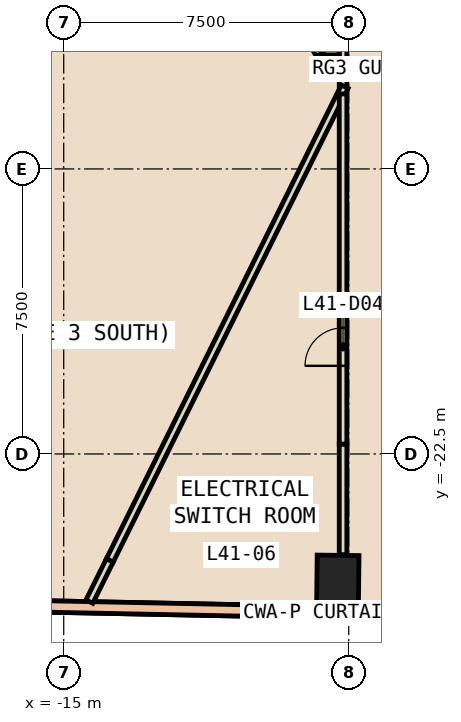
"""IFC4 building model, lengths in metres.
Left out: names, types, materials, properties, quantities, classifications, styles, units other than length and angle.
Written with IfcOpenShell. Run it as: python <this file> out.ifc"""

import sys

from ifc_helpers import new_model, si_unit, direction, frame, frame_2d, origin, origin_2d, place, context, subcontext, project, spatial, rectangle, extrude, element, fill, save


model = new_model("IFC4")
c1 = context("Model", 3, precision=1e-05, world=origin(), true_north=direction((0.0, 1.0)))
c2 = subcontext(c1, "Body", "Model", "MODEL_VIEW")
j1 = project(units=[si_unit("LENGTHUNIT", "METRE"), si_unit("PLANEANGLEUNIT", "RADIAN")], contexts=[c1])
p1 = place(None, origin())
s1 = spatial("IfcSite", under=j1, at=p1, CompositionType="ELEMENT")
p2 = place(p1, origin())
s2 = spatial("IfcBuilding", under=s1, at=p2, CompositionType="ELEMENT")
p3 = place(p2, frame((0.0, 0.0, 184.4)))
s3 = spatial("IfcBuildingStorey", under=s2, at=p3, CompositionType="ELEMENT", Elevation=184.4)
p4 = place(p3, frame((-7.789, -25.917, -0.6), z_axis=(0.0, 0.0, 1.0), x_axis=(-0.999931015761, 0.011745795767, 0.0)))
e1 = element("IfcColumn", 1, at=p4, inside=s3, PredefinedType="COLUMN", context=c2, shape_type="SweptSolid", body=[
    extrude(rectangle(XDim=1.1, YDim=1.5, at=origin_2d()), origin(), (0.0, 0.0, 1.0), 5.4),
])
p5 = place(p3, frame((-9.31, -5.375, 0.0), z_axis=(0.0, 0.0, 1.0), x_axis=(-0.866015103238, -0.500017840646, 0.0)))
e2 = element("IfcWall", 2, at=p5, inside=s3, PredefinedType="SHEAR", context=c2, shape_type="SweptSolid", body=[
    extrude(rectangle(XDim=27.139, YDim=1.0, at=frame_2d((13.57, 0.0))), origin(), (0.0, 0.0, 1.0), 4.8),
])
p6 = place(p3, frame((-8.349, -26.736, 0.0), z_axis=(0.0, 0.0, 1.0), x_axis=(0.999940879068, -0.010873746799, 0.0)))
e3 = element("IfcWall", 3, at=p6, inside=s3, PredefinedType="STANDARD", context=c2, shape_type="SweptSolid", body=[
    extrude(rectangle(XDim=1.1, YDim=0.15, at=frame_2d((0.55, 0.0))), origin(), (0.0, 0.0, 1.0), 4.8),
])
p7 = place(p3, frame((-15.68, -26.508, 0.0), z_axis=(0.0, 0.0, 1.0), x_axis=(0.999796530884, -0.020171683903, 0.0)))
e4 = element("IfcWall", 4, at=p7, inside=s3, PredefinedType="STANDARD", context=c2, shape_type="SweptSolid", body=[
    extrude(rectangle(XDim=7.334, YDim=0.3, at=frame_2d((3.667, 0.0))), origin(), (0.0, 0.0, 1.0), 1.2),
])
p8 = place(p3, frame((-15.68, -26.508, 4.0), z_axis=(0.0, 0.0, 1.0), x_axis=(0.999796530884, -0.020171683903, 0.0)))
e5 = element("IfcWall", 5, at=p8, inside=s3, PredefinedType="STANDARD", context=c2, shape_type="SweptSolid", body=[
    extrude(rectangle(XDim=7.334, YDim=0.3, at=frame_2d((3.667, 0.0))), origin(), (0.0, 0.0, 1.0), 0.8),
])
p9 = place(p3, frame((-7.65, -12.826, 0.0), z_axis=(0.0, 0.0, 1.0), x_axis=(0.0, 1.0, 0.0)))
e6 = element("IfcWall", 6, at=p9, inside=s3, PredefinedType="PARTITIONING", context=c2, shape_type="SweptSolid", body=[
    extrude(rectangle(XDim=1.026, YDim=0.2, at=frame_2d((0.513, 0.0))), origin(), (0.0, 0.0, 1.0), 4.8),
])
p10 = place(p3, frame((-7.75, -11.9, 0.0), z_axis=(0.0, 0.0, 1.0), x_axis=(-1.0, 0.0, 0.0)))
e7 = element("IfcWall", 7, at=p10, inside=s3, PredefinedType="PARTITIONING", context=c2, shape_type="SweptSolid", body=[
    extrude(rectangle(XDim=0.464, YDim=0.2, at=frame_2d((0.232, 0.0))), origin(), (0.0, 0.0, 1.0), 2.4),
])
p11 = place(p3, frame((-8.264, -11.987, 0.0), z_axis=(0.0, 0.0, 1.0), x_axis=(-0.499633176362, 0.866237085952, 0.0)))
e8 = element("IfcWall", 8, at=p11, inside=s3, PredefinedType="PARTITIONING", context=c2, shape_type="SweptSolid", body=[
    extrude(rectangle(XDim=1.105, YDim=0.2, at=frame_2d((0.552, 0.0))), origin(), (0.0, 0.0, 1.0), 2.4),
])
p12 = place(p3, frame((-7.65, -25.149, 0.0), z_axis=(0.0, 0.0, 1.0), x_axis=(0.0, 1.0, 0.0)))
e9 = element("IfcWall", 9, at=p12, inside=s3, PredefinedType="PARTITIONING", context=c2, shape_type="SweptSolid", body=[
    extrude(rectangle(XDim=2.909, YDim=0.2, at=frame_2d((1.455, 0.0))), origin(), (0.0, 0.0, 1.0), 4.8),
])
p13 = place(p3, frame((-7.606, -12.836, 0.0), z_axis=(0.0, 0.0, 1.0), x_axis=(-0.444256696047, -0.895899541253, 0.0)))
e10 = element("IfcWall", 10, at=p13, inside=s3, PredefinedType="PARTITIONING", context=c2, shape_type="SweptSolid", body=[
    extrude(rectangle(XDim=13.916, YDim=0.2, at=frame_2d((6.958, 0.0))), origin(), (0.0, 0.0, 1.0), 4.8),
])
p14 = place(p3, frame((-35.502, -17.996, 0.0), z_axis=(0.0, 0.0, 1.0), x_axis=(0.866041720547, 0.499971737474, 0.0)))
e11 = element("IfcWall", 11, at=p14, inside=s3, PredefinedType="PARTITIONING", context=c2, shape_type="SweptSolid", body=[
    extrude(rectangle(XDim=28.994, YDim=0.2, at=frame_2d((14.497, 0.0))), origin(), (0.0, 0.0, 1.0), 4.8),
])
p15 = place(p3, frame((-7.65, -22.24, 0.0), z_axis=(0.0, 0.0, 1.0), x_axis=(0.0, 1.0, 0.0)))
e12 = element("IfcWall", 12, at=p15, inside=s3, PredefinedType="PARTITIONING", context=c2, shape_type="SweptSolid", body=[
    extrude(rectangle(XDim=3.455, YDim=0.2, at=frame_2d((1.728, 0.0))), origin(), (0.0, 0.0, 1.0), 2.4),
])
p16 = place(p15, frame((2.059, 0.0, 0.0)))
e13 = element("IfcOpeningElement", 13, at=p16, cuts=e12, PredefinedType="OPENING", context=c2, shape_type="SweptSolid", body=[
    extrude(rectangle(XDim=1.0, YDim=2.1, at=frame_2d((0.5, 1.05))), frame((0.0, 0.11, 0.0), z_axis=(0.0, -1.0, 0.0), x_axis=(1.0, 0.0, 0.0)), (0.0, 0.0, 1.0), 0.22),
])
p17 = place(p3, frame((-7.65, -18.785, 0.0), z_axis=(0.0, 0.0, 1.0), x_axis=(0.0, 1.0, 0.0)))
e14 = element("IfcWall", 14, at=p17, inside=s3, PredefinedType="PARTITIONING", context=c2, shape_type="SweptSolid", body=[
    extrude(rectangle(XDim=5.759, YDim=0.2, at=frame_2d((2.879, 0.0))), origin(), (0.0, 0.0, 1.0), 4.8),
])
p18 = place(p3, frame((-13.788, -25.303, 0.0), z_axis=(0.0, 0.0, 1.0), x_axis=(-0.444462646758, -0.895797385371, 0.0)))
e15 = element("IfcWall", 15, at=p18, inside=s3, PredefinedType="PARTITIONING", context=c2, shape_type="SweptSolid", body=[
    extrude(rectangle(XDim=1.208, YDim=0.2, at=frame_2d((0.604, 0.0))), origin(), (0.0, 0.0, 1.0), 2.4),
])
p19 = place(p16, origin())
e16 = element("IfcDoor", 16, at=p19, inside=s3, OperationType="SINGLE_SWING_RIGHT", PredefinedType="DOOR", context=c2, shape_type="SweptSolid", body=[
    extrude(rectangle(XDim=1.0, YDim=2.1, at=frame_2d((0.5, 1.05))), frame((0.0, 0.025, 0.0), z_axis=(0.0, -1.0, 0.0), x_axis=(1.0, 0.0, 0.0)), (0.0, 0.0, 1.0), 0.05),
])
fill(e13, e16)
save(model, sys.argv[1])
